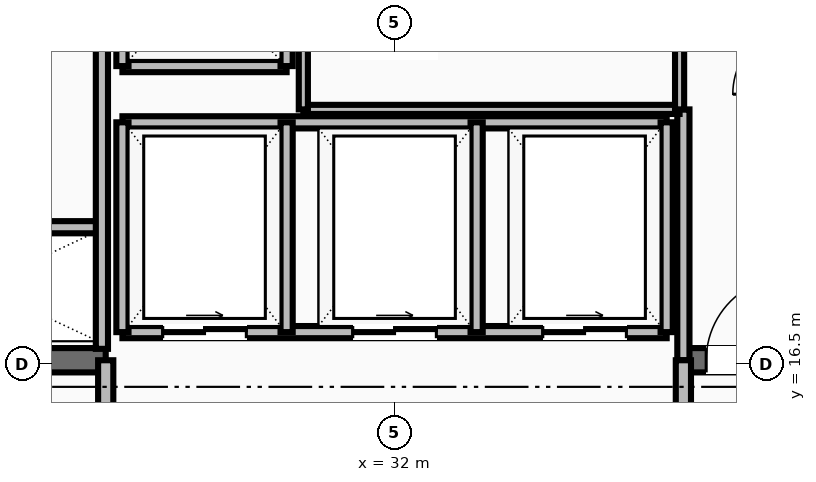
"""IFC4 building model, lengths in metres.
Left out: names, types, materials, properties, quantities, classifications, styles, units other than length and angle.
Written with IfcOpenShell. Run it as: python <this file> out.ifc"""

import sys

from ifc_helpers import new_model, si_unit, direction, frame, frame_2d, origin, place, context, subcontext, project, spatial, rectangle, extrude, element, fill, save


model = new_model("IFC4")
c1 = context("Model", 3, precision=1e-05, world=origin(), true_north=direction((0.0, 1.0)))
c2 = subcontext(c1, "Body", "Model", "MODEL_VIEW")
j1 = project(units=[si_unit("LENGTHUNIT", "METRE"), si_unit("PLANEANGLEUNIT", "RADIAN")], contexts=[c1])
p1 = place(None, origin())
s1 = spatial("IfcSite", under=j1, at=p1, CompositionType="ELEMENT")
p2 = place(p1, origin())
s2 = spatial("IfcBuilding", under=s1, at=p2, CompositionType="ELEMENT")
p3 = place(p2, frame((0.0, 0.0, 232.8)))
s3 = spatial("IfcBuildingStorey", under=s2, at=p3, CompositionType="ELEMENT", Elevation=232.8)
p4 = place(p3, frame((24.96, 16.55, 0.0), z_axis=(0.0, 0.0, 1.0), x_axis=(1.0, 0.0, 0.0)))
e1 = element("IfcWall", 1, at=p4, inside=s3, PredefinedType="SHEAR", context=c2, shape_type="SweptSolid", body=[
    extrude(rectangle(XDim=3.24, YDim=0.32, at=frame_2d((1.62, 0.0))), origin(), (0.0, 0.0, 1.0), 3.6),
])
p5 = place(p3, frame((35.8, 16.55, 0.0), z_axis=(0.0, 0.0, 1.0), x_axis=(1.0, 0.0, 0.0)))
e2 = element("IfcWall", 2, at=p5, inside=s3, PredefinedType="SHEAR", context=c2, shape_type="SweptSolid", body=[
    extrude(rectangle(XDim=3.24, YDim=0.32, at=frame_2d((1.62, 0.0))), origin(), (0.0, 0.0, 1.0), 3.6),
])
p6 = place(p5, frame((0.3, 0.0, 0.0)))
e3 = element("IfcOpeningElement", 3, at=p6, cuts=e2, PredefinedType="OPENING", context=c2, shape_type="SweptSolid", body=[
    extrude(rectangle(XDim=1.1, YDim=2.1, at=frame_2d((0.55, 1.05))), frame((0.0, 0.17, 0.0), z_axis=(0.0, -1.0, 0.0), x_axis=(1.0, 0.0, 0.0)), (0.0, 0.0, 1.0), 0.34),
])
p7 = place(p3, frame((35.8, 16.55, 0.0), z_axis=(0.0, 0.0, 1.0), x_axis=(0.0, 1.0, 0.0)))
e4 = element("IfcWall", 4, at=p7, inside=s3, PredefinedType="SOLIDWALL", context=c2, shape_type="SweptSolid", body=[
    extrude(rectangle(XDim=3.3, YDim=0.16, at=frame_2d((1.65, 0.0))), origin(), (0.0, 0.0, 1.0), 2.87),
])
for number, where, z_axis, x_axis in (
    (5, (28.2, 14.35, 0.0), (0.0, 0.0, 1.0), (0.0, 1.0, 0.0)),
    (6, (35.8, 14.35, 0.0), (0.0, 0.0, 1.0), (0.0, 1.0, 0.0)),
):
    element("IfcWall", number, at=place(p3, frame(where, z_axis=z_axis, x_axis=x_axis)), inside=s3, PredefinedType="SOLIDWALL", context=c2, shape_type="SweptSolid", body=[
        extrude(rectangle(XDim=2.2, YDim=0.2, at=frame_2d((1.1, 0.0))), origin(), (0.0, 0.0, 1.0), 2.87),
    ])
for number, where, z_axis, x_axis in (
    (7, (28.42, 20.42, 0.0), (0.0, 0.0, 1.0), (1.0, 0.0, 0.0)),
    (8, (28.42, 20.42, 0.0), (0.0, 0.0, 1.0), (0.0, 1.0, 0.0)),
    (9, (30.58, 20.42, 0.0), (0.0, 0.0, 1.0), (0.0, 1.0, 0.0)),
):
    element("IfcWall", number, at=place(p3, frame(where, z_axis=z_axis, x_axis=x_axis)), inside=s3, PredefinedType="SOLIDWALL", context=c2, shape_type="SweptSolid", body=[
        extrude(rectangle(XDim=2.16, YDim=0.16, at=frame_2d((1.08, 0.0))), origin(), (0.0, 0.0, 1.0), 2.87),
    ])
p8 = place(p3, frame((28.42, 16.92, 0.0), z_axis=(0.0, 0.0, 1.0), x_axis=(1.0, 0.0, 0.0)))
e10 = element("IfcWall", 10, at=p8, inside=s3, PredefinedType="SOLIDWALL", context=c2, shape_type="SweptSolid", body=[
    extrude(rectangle(XDim=7.16, YDim=0.16, at=frame_2d((3.58, 0.0))), origin(), (0.0, 0.0, 1.0), 2.87),
])
p9 = place(p8, frame((0.53, 0.0, 0.0)))
e11 = element("IfcOpeningElement", 11, at=p9, cuts=e10, PredefinedType="OPENING", context=c2, shape_type="SweptSolid", body=[
    extrude(rectangle(XDim=1.1, YDim=2.15, at=frame_2d((0.55, 1.075))), frame((0.0, 0.09, 0.0), z_axis=(0.0, -1.0, 0.0), x_axis=(1.0, 0.0, 0.0)), (0.0, 0.0, 1.0), 0.18),
])
p10 = place(p8, frame((3.03, 0.0, 0.0)))
e12 = element("IfcOpeningElement", 12, at=p10, cuts=e10, PredefinedType="OPENING", context=c2, shape_type="SweptSolid", body=[
    extrude(rectangle(XDim=1.1, YDim=2.15, at=frame_2d((0.55, 1.075))), frame((0.0, 0.09, 0.0), z_axis=(0.0, -1.0, 0.0), x_axis=(1.0, 0.0, 0.0)), (0.0, 0.0, 1.0), 0.18),
])
p11 = place(p8, frame((5.53, 0.0, 0.0)))
e13 = element("IfcOpeningElement", 13, at=p11, cuts=e10, PredefinedType="OPENING", context=c2, shape_type="SweptSolid", body=[
    extrude(rectangle(XDim=1.1, YDim=2.15, at=frame_2d((0.55, 1.075))), frame((0.0, 0.09, 0.0), z_axis=(0.0, -1.0, 0.0), x_axis=(1.0, 0.0, 0.0)), (0.0, 0.0, 1.0), 0.18),
])
p12 = place(p3, frame((28.42, 19.68, 0.0), z_axis=(0.0, 0.0, 1.0), x_axis=(1.0, 0.0, 0.0)))
e14 = element("IfcWall", 14, at=p12, inside=s3, PredefinedType="SOLIDWALL", context=c2, shape_type="SweptSolid", body=[
    extrude(rectangle(XDim=7.16, YDim=0.16, at=frame_2d((3.58, 0.0))), origin(), (0.0, 0.0, 1.0), 2.87),
])
for number, where, z_axis, x_axis in (
    (15, (28.42, 16.92, 0.0), (0.0, 0.0, 1.0), (0.0, 1.0, 0.0)),
    (16, (30.58, 16.92, 0.0), (0.0, 0.0, 1.0), (0.0, 1.0, 0.0)),
    (17, (33.08, 16.92, 0.0), (0.0, 0.0, 1.0), (0.0, 1.0, 0.0)),
    (18, (35.58, 16.92, 0.0), (0.0, 0.0, 1.0), (0.0, 1.0, 0.0)),
):
    element("IfcWall", number, at=place(p3, frame(where, z_axis=z_axis, x_axis=x_axis)), inside=s3, PredefinedType="SOLIDWALL", context=c2, shape_type="SweptSolid", body=[
        extrude(rectangle(XDim=2.76, YDim=0.16, at=frame_2d((1.38, 0.0))), origin(), (0.0, 0.0, 1.0), 2.87),
    ])
p13 = place(p3, frame((30.8, 19.85, 0.0), z_axis=(0.0, 0.0, 1.0), x_axis=(1.0, 0.0, 0.0)))
e19 = element("IfcWall", 19, at=p13, inside=s3, PredefinedType="PARTITIONING", context=c2, shape_type="SweptSolid", body=[
    extrude(rectangle(XDim=4.95, YDim=0.12, at=frame_2d((2.475, 0.0))), origin(), (0.0, 0.0, 1.0), 2.87),
])
for number, where, z_axis, x_axis in (
    (20, (30.8, 19.85, 0.0), (0.0, 0.0, 1.0), (0.0, 1.0, 0.0)),
    (21, (35.75, 19.85, 0.0), (0.0, 0.0, 1.0), (0.0, 1.0, 0.0)),
):
    element("IfcWall", number, at=place(p3, frame(where, z_axis=z_axis, x_axis=x_axis)), inside=s3, PredefinedType="PARTITIONING", context=c2, shape_type="SweptSolid", body=[
        extrude(rectangle(XDim=2.83, YDim=0.12, at=frame_2d((1.415, 0.0))), origin(), (0.0, 0.0, 1.0), 2.87),
    ])
p14 = place(p3, frame((24.95, 18.3, 0.0), z_axis=(0.0, 0.0, 1.0), x_axis=(1.0, 0.0, 0.0)))
e22 = element("IfcWall", 22, at=p14, inside=s3, PredefinedType="SOLIDWALL", context=c2, shape_type="SweptSolid", body=[
    extrude(rectangle(XDim=3.2, YDim=0.16, at=frame_2d((1.6, 0.0))), origin(), (0.0, 0.0, 1.0), 2.87),
])
p15 = place(p3, frame((28.15, 16.7, 0.0), z_axis=(0.0, 0.0, 1.0), x_axis=(0.0, 1.0, 0.0)))
e23 = element("IfcWall", 23, at=p15, inside=s3, PredefinedType="SOLIDWALL", context=c2, shape_type="SweptSolid", body=[
    extrude(rectangle(XDim=6.05, YDim=0.16, at=frame_2d((3.025, 0.0))), origin(), (0.0, 0.0, 1.0), 2.87),
])
p16 = place(p6, origin())
e24 = element("IfcDoor", 24, at=p16, inside=s3, OperationType="SINGLE_SWING_RIGHT", PredefinedType="DOOR", context=c2, shape_type="SweptSolid", body=[
    extrude(rectangle(XDim=1.1, YDim=2.1, at=frame_2d((0.55, 1.05))), frame((0.0, 0.025, 0.0), z_axis=(0.0, -1.0, 0.0), x_axis=(1.0, 0.0, 0.0)), (0.0, 0.0, 1.0), 0.05),
])
fill(e3, e24)
p17 = place(p9, origin())
e25 = element("IfcDoor", 25, at=p17, inside=s3, OperationType="SLIDING_TO_RIGHT", PredefinedType="DOOR", context=c2, shape_type="SweptSolid", body=[
    extrude(rectangle(XDim=1.1, YDim=2.15, at=frame_2d((0.55, 1.075))), frame((0.0, 0.025, 0.0), z_axis=(0.0, -1.0, 0.0), x_axis=(1.0, 0.0, 0.0)), (0.0, 0.0, 1.0), 0.05),
])
fill(e11, e25)
p18 = place(p10, origin())
e26 = element("IfcDoor", 26, at=p18, inside=s3, OperationType="SLIDING_TO_RIGHT", PredefinedType="DOOR", context=c2, shape_type="SweptSolid", body=[
    extrude(rectangle(XDim=1.1, YDim=2.15, at=frame_2d((0.55, 1.075))), frame((0.0, 0.025, 0.0), z_axis=(0.0, -1.0, 0.0), x_axis=(1.0, 0.0, 0.0)), (0.0, 0.0, 1.0), 0.05),
])
fill(e12, e26)
p19 = place(p11, origin())
e27 = element("IfcDoor", 27, at=p19, inside=s3, OperationType="SLIDING_TO_RIGHT", PredefinedType="DOOR", context=c2, shape_type="SweptSolid", body=[
    extrude(rectangle(XDim=1.1, YDim=2.15, at=frame_2d((0.55, 1.075))), frame((0.0, 0.025, 0.0), z_axis=(0.0, -1.0, 0.0), x_axis=(1.0, 0.0, 0.0)), (0.0, 0.0, 1.0), 0.05),
])
fill(e13, e27)
save(model, sys.argv[1])
